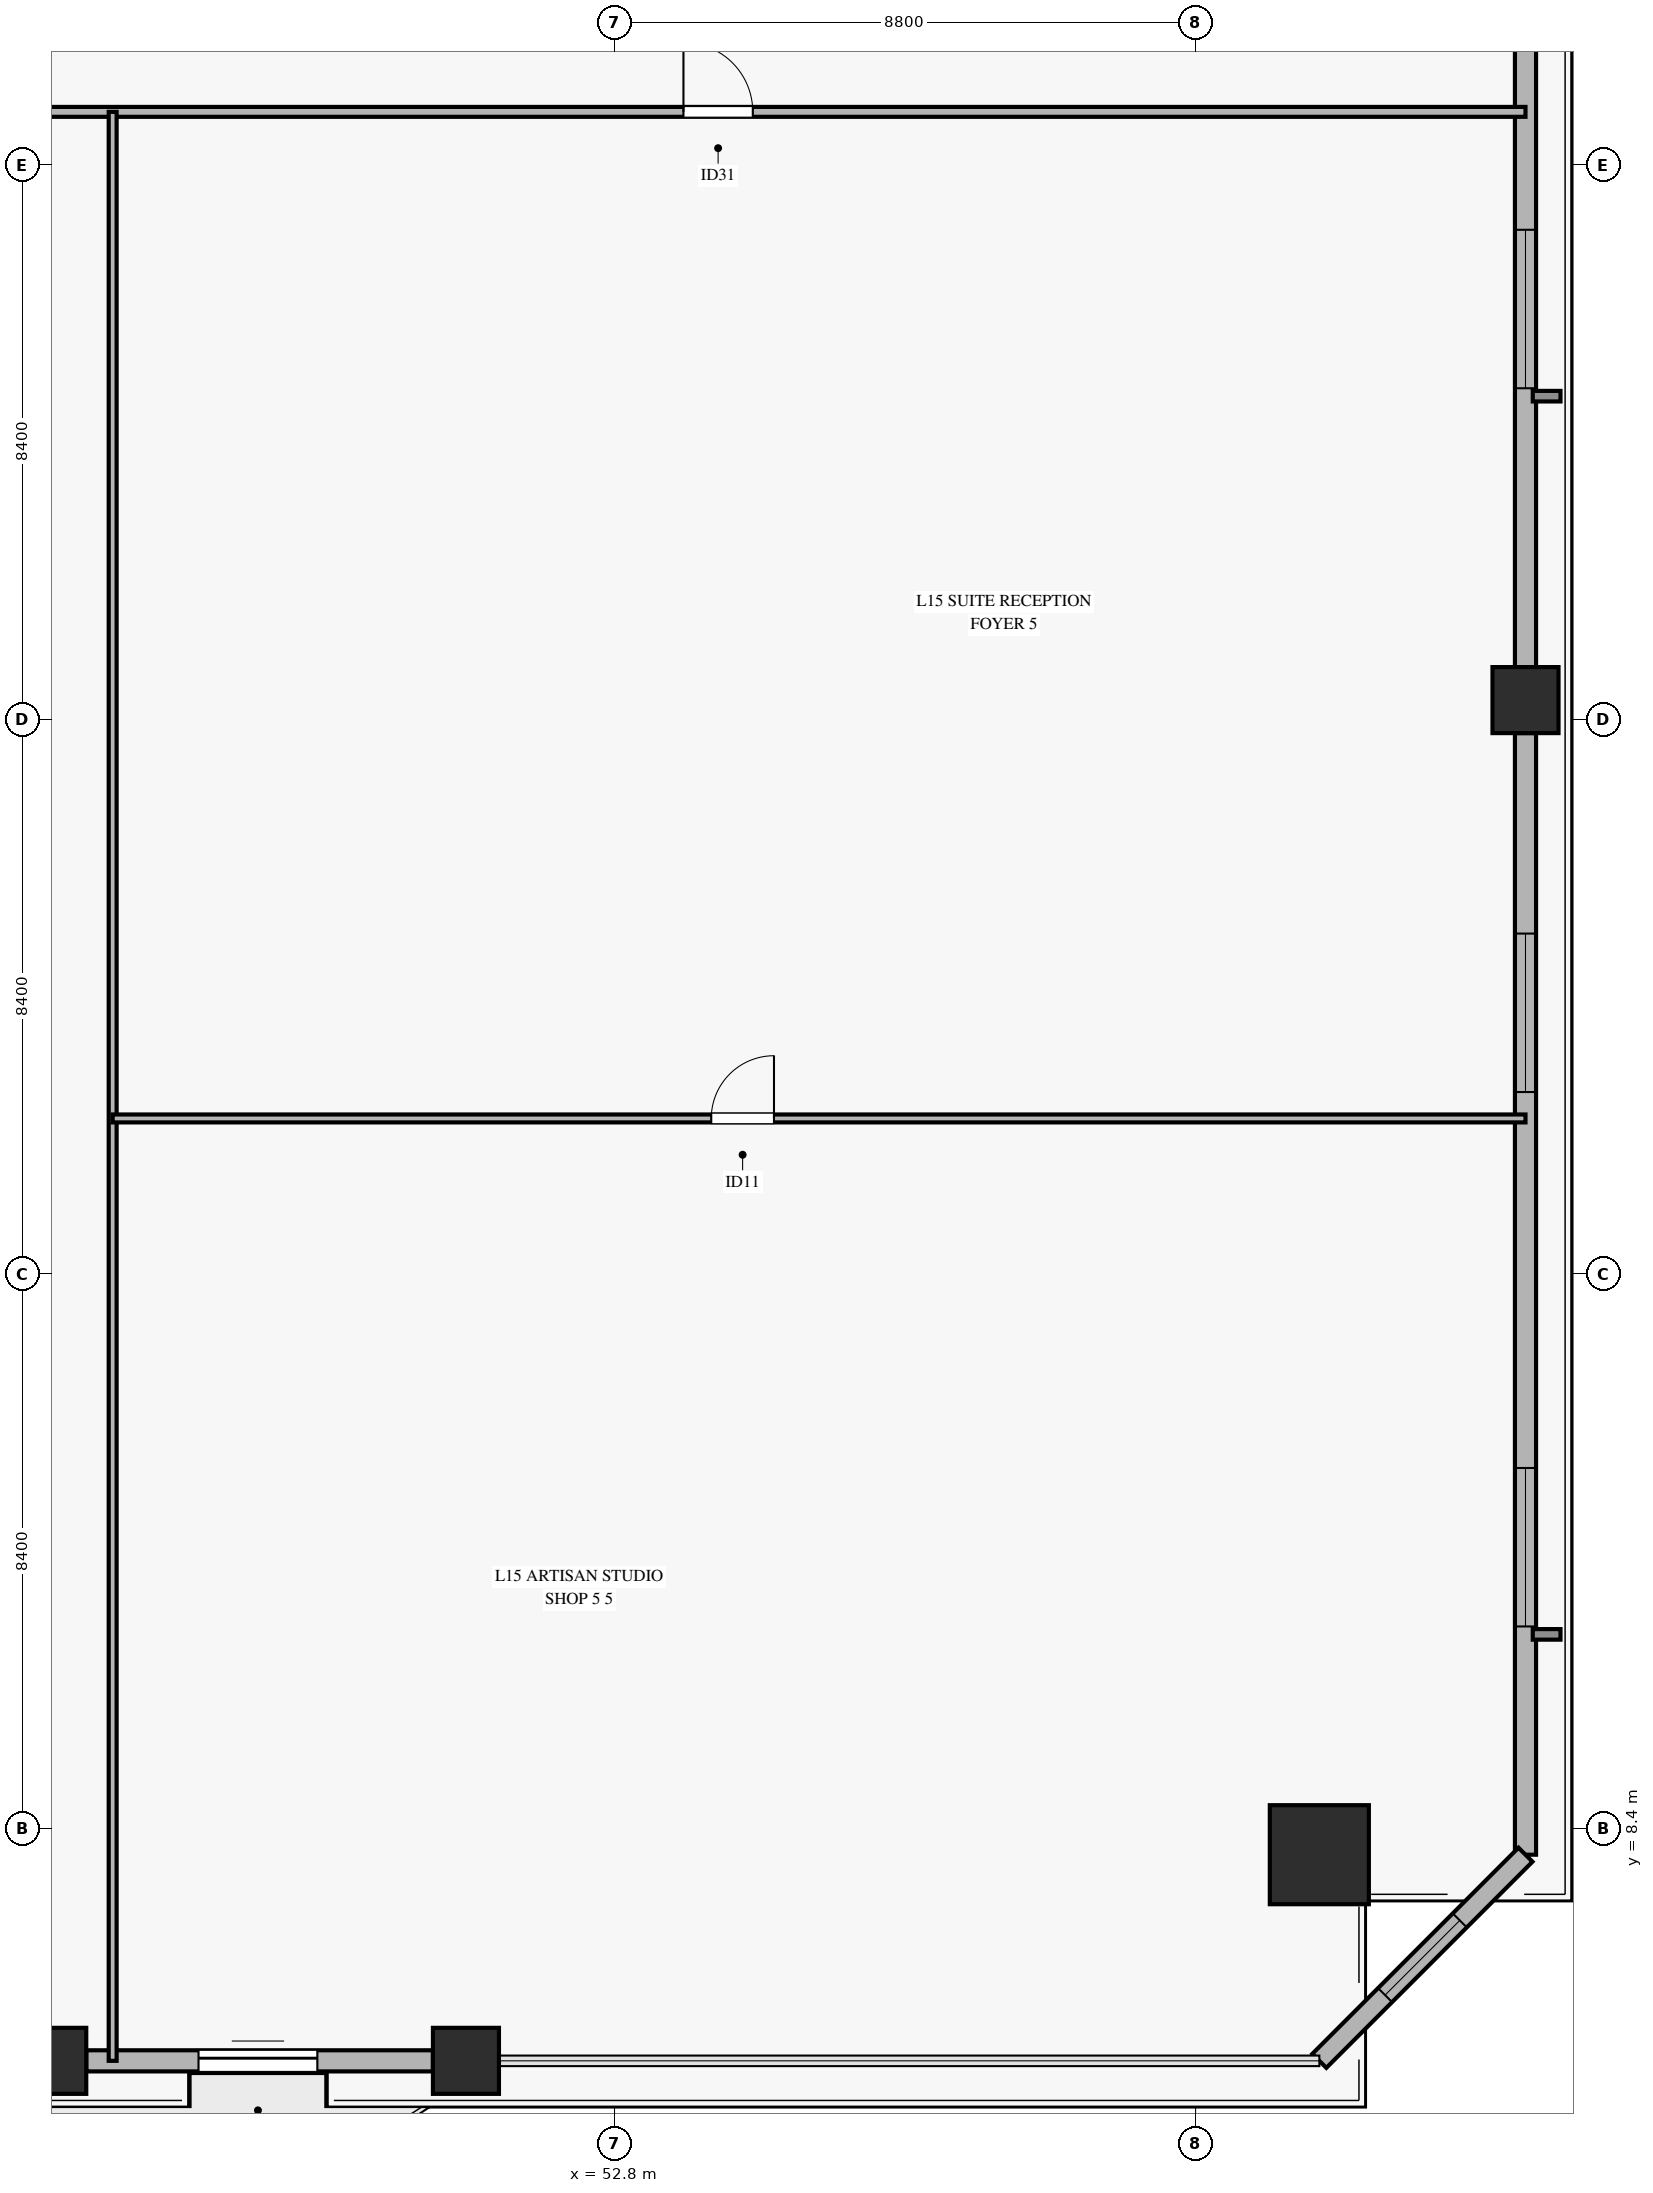
"""IFC4 building model, lengths in metres.
Left out: names, types, materials, properties, quantities, classifications, styles, units other than length and angle.
Written with IfcOpenShell. Run it as: python <this file> out.ifc"""

import sys

from ifc_helpers import new_model, si_unit, direction, frame, frame_2d, origin, origin_2d, place, context, subcontext, project, spatial, rectangle, hollow_rectangle, extrude, source, transform, mapped, element, fill, save


model = new_model("IFC4")
c1 = context("Model", 3, precision=1e-05, world=origin(), true_north=direction((0.0, 1.0)))
c2 = subcontext(c1, "Body", "Model", "MODEL_VIEW")
j1 = project(units=[si_unit("LENGTHUNIT", "METRE"), si_unit("PLANEANGLEUNIT", "RADIAN")], contexts=[c1])
p1 = place(None, origin())
s1 = spatial("IfcSite", under=j1, at=p1, CompositionType="ELEMENT")
p2 = place(p1, origin())
s2 = spatial("IfcBuilding", under=s1, at=p2, CompositionType="ELEMENT")
p3 = place(p2, frame((0.0, 0.0, 61.1)))
s3 = spatial("IfcBuildingStorey", under=s2, at=p3, CompositionType="ELEMENT", Elevation=61.1)
m1 = source(origin(), c2, "Body", "SweptSolid", [
    extrude(hollow_rectangle(XDim=1.5, YDim=1.5, WallThickness=0.07, at=origin_2d()), origin(), (0.0, 0.0, 1.0), 3.68),
])
p4 = place(p3, frame((63.474, 8.004, 0.0), z_axis=(0.0, 0.0, 1.0), x_axis=(1.0, 0.0, 0.0)))
e1 = element("IfcColumn", 1, at=p4, inside=s3, PredefinedType="COLUMN", context=c2, shape_type="MappedRepresentation", body=[
    mapped(m1, transform((0.0, 0.0, 0.0), x_axis=(1.0, 0.0, 0.0), y_axis=(0.0, 1.0, 0.0), z_axis=(0.0, 0.0, 1.0), scale=1.0)),
])
m2 = source(origin(), c2, "Body", "SweptSolid", [
    extrude(hollow_rectangle(XDim=1.0, YDim=1.0, WallThickness=0.045, at=origin_2d()), origin(), (0.0, 0.0, 1.0), 3.68),
])
for number, where, z_axis, x_axis in (
    (2, (44.3, 4.882, 0.0), (0.0, 0.0, 1.0), (1.0, 0.0, 0.0)),
    (3, (50.55, 4.882, 0.0), (0.0, 0.0, 1.0), (1.0, 0.0, 0.0)),
    (4, (66.596, 25.491, 0.0), (0.0, 0.0, 1.0), (1.0, 0.0, 0.0)),
):
    element("IfcColumn", number, at=place(p3, frame(where, z_axis=z_axis, x_axis=x_axis)), inside=s3, PredefinedType="COLUMN", context=c2, shape_type="MappedRepresentation", body=[
        mapped(m2, transform((0.0, 0.0, 0.0), x_axis=(1.0, 0.0, 0.0), y_axis=(0.0, 1.0, 0.0), z_axis=(0.0, 0.0, 1.0), scale=1.0)),
    ])
p5 = place(p3, frame((44.8, 4.882, 0.0), z_axis=(0.0, 0.0, 1.0), x_axis=(1.0, 0.0, 0.0)))
e5 = element("IfcWall", 5, at=p5, inside=s3, PredefinedType="SOLIDWALL", context=c2, shape_type="SweptSolid", body=[
    extrude(rectangle(XDim=5.25, YDim=0.32, at=frame_2d((2.625, 0.0))), origin(), (0.0, 0.0, 1.0), 3.16),
])
p6 = place(p5, frame((1.7, 0.0, 0.0)))
e6 = element("IfcOpeningElement", 6, at=p6, cuts=e5, PredefinedType="OPENING", context=c2, shape_type="SweptSolid", body=[
    extrude(rectangle(XDim=1.8, YDim=2.25, at=frame_2d((0.9, 1.125))), frame((0.0, 0.17, 0.0), z_axis=(0.0, -1.0, 0.0), x_axis=(1.0, 0.0, 0.0)), (0.0, 0.0, 1.0), 0.34),
])
p7 = place(p3, frame((66.596, 8.004, 0.0), z_axis=(0.0, 0.0, 1.0), x_axis=(0.0, 1.0, 0.0)))
e7 = element("IfcWall", 7, at=p7, inside=s3, PredefinedType="SOLIDWALL", context=c2, shape_type="SweptSolid", body=[
    extrude(rectangle(XDim=16.987, YDim=0.32, at=frame_2d((8.494, 0.0))), origin(), (0.0, 0.0, 1.0), 3.16),
])
p8 = place(p7, frame((3.457, 0.0, 0.45)))
e8 = element("IfcOpeningElement", 8, at=p8, cuts=e7, PredefinedType="OPENING", context=c2, shape_type="SweptSolid", body=[
    extrude(rectangle(XDim=2.4, YDim=2.1, at=frame_2d((1.2, 1.05))), frame((0.0, 0.17, 0.0), z_axis=(0.0, -1.0, 0.0), x_axis=(1.0, 0.0, 0.0)), (0.0, 0.0, 1.0), 0.34),
])
p9 = place(p7, frame((11.551, 0.0, 0.45)))
e9 = element("IfcOpeningElement", 9, at=p9, cuts=e7, PredefinedType="OPENING", context=c2, shape_type="SweptSolid", body=[
    extrude(rectangle(XDim=2.4, YDim=2.1, at=frame_2d((1.2, 1.05))), frame((0.0, 0.17, 0.0), z_axis=(0.0, -1.0, 0.0), x_axis=(1.0, 0.0, 0.0)), (0.0, 0.0, 1.0), 0.34),
])
p10 = place(p3, frame((66.596, 25.991, 0.0), z_axis=(0.0, 0.0, 1.0), x_axis=(0.0, 1.0, 0.0)))
e10 = element("IfcWall", 10, at=p10, inside=s3, PredefinedType="SOLIDWALL", context=c2, shape_type="SweptSolid", body=[
    extrude(rectangle(XDim=16.987, YDim=0.32, at=frame_2d((8.494, 0.0))), origin(), (0.0, 0.0, 1.0), 3.16),
])
p11 = place(p10, frame((4.223, 0.0, 0.45)))
e11 = element("IfcOpeningElement", 11, at=p11, cuts=e10, PredefinedType="OPENING", context=c2, shape_type="SweptSolid", body=[
    extrude(rectangle(XDim=2.4, YDim=2.1, at=frame_2d((1.2, 1.05))), frame((0.0, 0.17, 0.0), z_axis=(0.0, -1.0, 0.0), x_axis=(1.0, 0.0, 0.0)), (0.0, 0.0, 1.0), 0.34),
])
p12 = place(p3, frame((63.474, 4.882, 0.0), z_axis=(0.0, 0.0, 1.0), x_axis=(0.707106781187, 0.707106781187, 0.0)))
e12 = element("IfcWall", 12, at=p12, inside=s3, PredefinedType="SOLIDWALL", context=c2, shape_type="SweptSolid", body=[
    extrude(rectangle(XDim=4.415, YDim=0.3, at=frame_2d((2.208, 0.0))), origin(), (0.0, 0.0, 1.0), 3.16),
])
p13 = place(p12, frame((1.408, 0.0, 0.45)))
e13 = element("IfcOpeningElement", 13, at=p13, cuts=e12, PredefinedType="OPENING", context=c2, shape_type="SweptSolid", body=[
    extrude(rectangle(XDim=1.6, YDim=2.0, at=frame_2d((0.8, 1.0))), frame((0.0, 0.16, 0.0), z_axis=(0.0, -1.0, 0.0), x_axis=(1.0, 0.0, 0.0)), (0.0, 0.0, 1.0), 0.32),
])
p14 = place(p3, frame((3.805, 34.4, 0.0), z_axis=(0.0, 0.0, 1.0), x_axis=(1.0, 0.0, 0.0)))
e14 = element("IfcWall", 14, at=p14, inside=s3, PredefinedType="PARTITIONING", context=c2, shape_type="SweptSolid", body=[
    extrude(rectangle(XDim=62.791, YDim=0.15, at=frame_2d((31.396, 0.0))), origin(), (0.0, 0.0, 1.0), 2.765),
])
p15 = place(p14, frame((7.564, 0.0, 0.0)))
e15 = element("IfcOpeningElement", 15, at=p15, cuts=e14, PredefinedType="OPENING", context=c2, shape_type="SweptSolid", body=[
    extrude(rectangle(XDim=1.05, YDim=2.15, at=frame_2d((0.525, 1.075))), frame((0.0, 0.085, 0.0), z_axis=(0.0, -1.0, 0.0), x_axis=(1.0, 0.0, 0.0)), (0.0, 0.0, 1.0), 0.17),
])
p16 = place(p14, frame((21.886, 0.0, 0.0)))
e16 = element("IfcOpeningElement", 16, at=p16, cuts=e14, PredefinedType="OPENING", context=c2, shape_type="SweptSolid", body=[
    extrude(rectangle(XDim=1.05, YDim=2.15, at=frame_2d((0.525, 1.075))), frame((0.0, 0.085, 0.0), z_axis=(0.0, -1.0, 0.0), x_axis=(1.0, 0.0, 0.0)), (0.0, 0.0, 1.0), 0.17),
])
p17 = place(p14, frame((30.202, 0.0, 0.0)))
e17 = element("IfcOpeningElement", 17, at=p17, cuts=e14, PredefinedType="OPENING", context=c2, shape_type="SweptSolid", body=[
    extrude(rectangle(XDim=1.05, YDim=2.15, at=frame_2d((0.525, 1.075))), frame((0.0, 0.085, 0.0), z_axis=(0.0, -1.0, 0.0), x_axis=(1.0, 0.0, 0.0)), (0.0, 0.0, 1.0), 0.17),
])
p18 = place(p14, frame((37.73, 0.0, 0.0)))
e18 = element("IfcOpeningElement", 18, at=p18, cuts=e14, PredefinedType="OPENING", context=c2, shape_type="SweptSolid", body=[
    extrude(rectangle(XDim=1.05, YDim=2.15, at=frame_2d((0.525, 1.075))), frame((0.0, 0.085, 0.0), z_axis=(0.0, -1.0, 0.0), x_axis=(1.0, 0.0, 0.0)), (0.0, 0.0, 1.0), 0.17),
])
p19 = place(p14, frame((50.039, 0.0, 0.0)))
e19 = element("IfcOpeningElement", 19, at=p19, cuts=e14, PredefinedType="OPENING", context=c2, shape_type="SweptSolid", body=[
    extrude(rectangle(XDim=1.05, YDim=2.15, at=frame_2d((0.525, 1.075))), frame((0.0, 0.085, 0.0), z_axis=(0.0, -1.0, 0.0), x_axis=(1.0, 0.0, 0.0)), (0.0, 0.0, 1.0), 0.17),
])
p20 = place(p3, frame((45.2, 4.882, 0.0), z_axis=(0.0, 0.0, 1.0), x_axis=(0.0, 1.0, 0.0)))
e20 = element("IfcWall", 20, at=p20, inside=s3, PredefinedType="PARTITIONING", context=c2, shape_type="SweptSolid", body=[
    extrude(rectangle(XDim=29.518, YDim=0.12, at=frame_2d((14.759, 0.0))), origin(), (0.0, 0.0, 1.0), 3.165),
])
p21 = place(p3, frame((45.2, 19.155, 0.0), z_axis=(0.0, 0.0, 1.0), x_axis=(1.0, 0.0, 0.0)))
e21 = element("IfcWall", 21, at=p21, inside=s3, PredefinedType="PARTITIONING", context=c2, shape_type="SweptSolid", body=[
    extrude(rectangle(XDim=21.396, YDim=0.12, at=frame_2d((10.698, 0.0))), origin(), (0.0, 0.0, 1.0), 2.765),
])
p22 = place(p21, frame((9.065, 0.0, 0.0)))
e22 = element("IfcOpeningElement", 22, at=p22, cuts=e21, PredefinedType="OPENING", context=c2, shape_type="SweptSolid", body=[
    extrude(rectangle(XDim=0.95, YDim=2.1, at=frame_2d((0.475, 1.05))), frame((0.0, 0.07, 0.0), z_axis=(0.0, -1.0, 0.0), x_axis=(1.0, 0.0, 0.0)), (0.0, 0.0, 1.0), 0.14),
])
m3 = source(origin(), c2, "Body", "SweptSolid", [
    extrude(rectangle(XDim=1.8, YDim=2.25, at=frame_2d((0.9, 1.125))), frame((0.0, 0.025, 0.0), z_axis=(0.0, -1.0, 0.0), x_axis=(1.0, 0.0, 0.0)), (0.0, 0.0, 1.0), 0.05),
])
p23 = place(p6, origin())
e23 = element("IfcDoor", 23, at=p23, inside=s3, OperationType="SLIDING_TO_LEFT", PredefinedType="DOOR", context=c2, shape_type="MappedRepresentation", body=[
    mapped(m3, transform((0.0, 0.0, 0.0), x_axis=(1.0, 0.0, 0.0), y_axis=(0.0, 1.0, 0.0), z_axis=(0.0, 0.0, 1.0), scale=1.0)),
])
fill(e6, e23)
m4 = source(origin(), c2, "Body", "SweptSolid", [
    extrude(rectangle(XDim=2.4, YDim=2.1, at=frame_2d((1.2, 1.05))), frame((0.0, 0.03, 0.0), z_axis=(0.0, -1.0, 0.0), x_axis=(1.0, 0.0, 0.0)), (0.0, 0.0, 1.0), 0.06),
])
p24 = place(p8, origin())
e24 = element("IfcWindow", 24, at=p24, inside=s3, PartitioningType="SINGLE_PANEL", PredefinedType="WINDOW", context=c2, shape_type="MappedRepresentation", body=[
    mapped(m4, transform((0.0, 0.0, 0.0), x_axis=(1.0, 0.0, 0.0), y_axis=(0.0, 1.0, 0.0), z_axis=(0.0, 0.0, 1.0), scale=1.0)),
])
fill(e8, e24)
p25 = place(p9, origin())
e25 = element("IfcWindow", 25, at=p25, inside=s3, PartitioningType="SINGLE_PANEL", PredefinedType="WINDOW", context=c2, shape_type="MappedRepresentation", body=[
    mapped(m4, transform((0.0, 0.0, 0.0), x_axis=(1.0, 0.0, 0.0), y_axis=(0.0, 1.0, 0.0), z_axis=(0.0, 0.0, 1.0), scale=1.0)),
])
fill(e9, e25)
p26 = place(p11, origin())
e26 = element("IfcWindow", 26, at=p26, inside=s3, PartitioningType="SINGLE_PANEL", PredefinedType="WINDOW", context=c2, shape_type="MappedRepresentation", body=[
    mapped(m4, transform((0.0, 0.0, 0.0), x_axis=(1.0, 0.0, 0.0), y_axis=(0.0, 1.0, 0.0), z_axis=(0.0, 0.0, 1.0), scale=1.0)),
])
fill(e11, e26)
m5 = source(origin(), c2, "Body", "SweptSolid", [
    extrude(rectangle(XDim=1.6, YDim=2.0, at=frame_2d((0.8, 1.0))), frame((0.0, 0.03, 0.0), z_axis=(0.0, -1.0, 0.0), x_axis=(1.0, 0.0, 0.0)), (0.0, 0.0, 1.0), 0.06),
])
p27 = place(p13, origin())
e27 = element("IfcWindow", 27, at=p27, inside=s3, PartitioningType="SINGLE_PANEL", PredefinedType="WINDOW", context=c2, shape_type="MappedRepresentation", body=[
    mapped(m5, transform((0.0, 0.0, 0.0), x_axis=(1.0, 0.0, 0.0), y_axis=(0.0, 1.0, 0.0), z_axis=(0.0, 0.0, 1.0), scale=1.0)),
])
fill(e13, e27)
m6 = source(origin(), c2, "Body", "SweptSolid", [
    extrude(rectangle(XDim=1.05, YDim=2.15, at=frame_2d((0.525, 1.075))), frame((0.0, 0.025, 0.0), z_axis=(0.0, -1.0, 0.0), x_axis=(1.0, 0.0, 0.0)), (0.0, 0.0, 1.0), 0.05),
])
p28 = place(p19, origin())
e28 = element("IfcDoor", 28, at=p28, inside=s3, OperationType="SINGLE_SWING_LEFT", PredefinedType="DOOR", context=c2, shape_type="MappedRepresentation", body=[
    mapped(m6, transform((0.0, 0.0, 0.0), x_axis=(1.0, 0.0, 0.0), y_axis=(0.0, 1.0, 0.0), z_axis=(0.0, 0.0, 1.0), scale=1.0)),
])
fill(e19, e28)
m7 = source(origin(), c2, "Body", "SweptSolid", [
    extrude(rectangle(XDim=0.95, YDim=2.1, at=frame_2d((0.475, 1.05))), frame((0.0, 0.025, 0.0), z_axis=(0.0, -1.0, 0.0), x_axis=(1.0, 0.0, 0.0)), (0.0, 0.0, 1.0), 0.05),
])
p29 = place(p22, origin())
e29 = element("IfcDoor", 29, at=p29, inside=s3, OperationType="SINGLE_SWING_RIGHT", PredefinedType="DOOR", context=c2, shape_type="MappedRepresentation", body=[
    mapped(m7, transform((0.0, 0.0, 0.0), x_axis=(1.0, 0.0, 0.0), y_axis=(0.0, 1.0, 0.0), z_axis=(0.0, 0.0, 1.0), scale=1.0)),
])
fill(e22, e29)
save(model, sys.argv[1])
